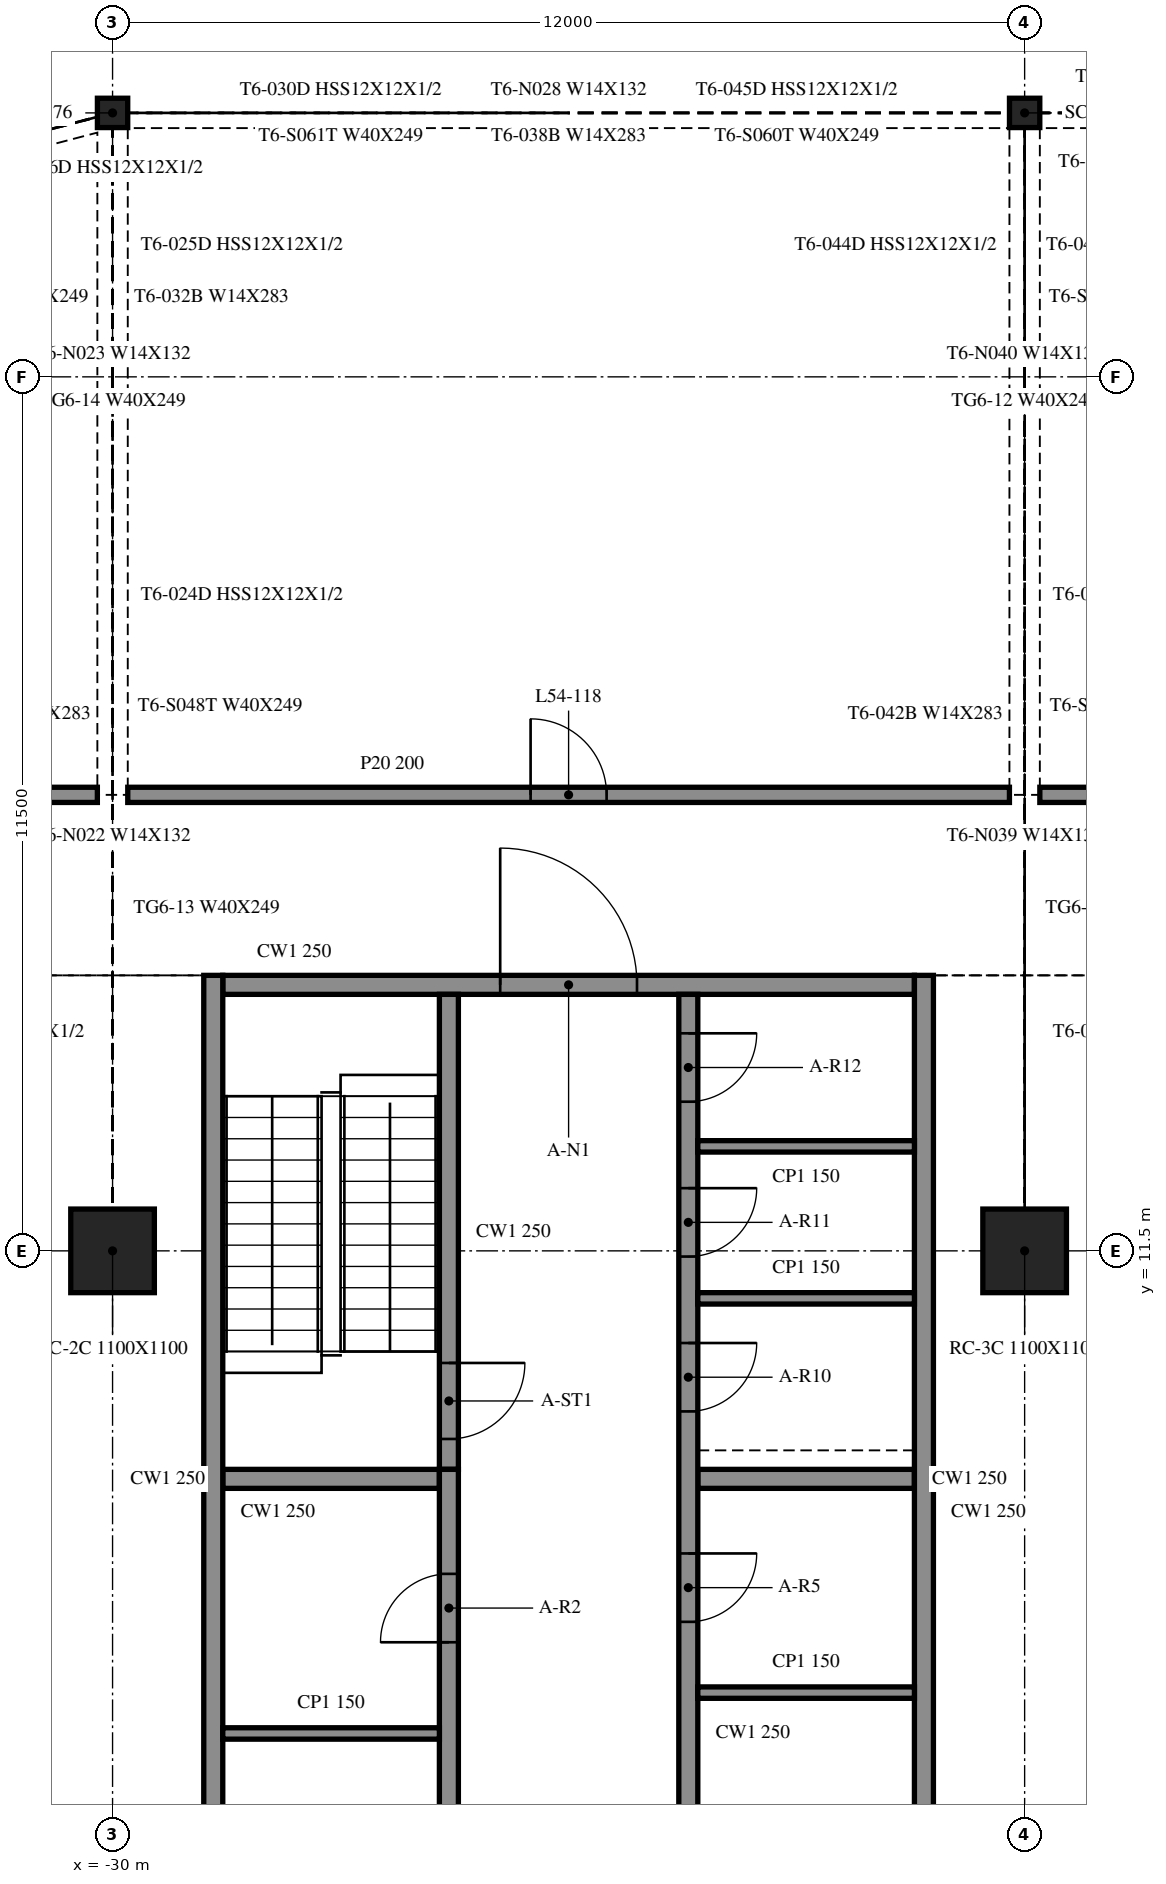
"""IFC4 building model, lengths in metres.
Left out: names, types, materials, properties, quantities, classifications, styles, units other than length and angle.
Written with IfcOpenShell. Run it as: python <this file> out.ifc"""

import sys

from ifc_helpers import new_model, si_unit, direction, frame, frame_2d, origin, origin_2d, place, context, subcontext, project, spatial, rectangle, i_section, extrude, element, fill, save


model = new_model("IFC4")
c1 = context("Model", 3, precision=1e-05, world=origin(), true_north=direction((0.0, 1.0)))
c2 = subcontext(c1, "Body", "Model", "MODEL_VIEW")
j1 = project(units=[si_unit("LENGTHUNIT", "METRE"), si_unit("PLANEANGLEUNIT", "RADIAN")], contexts=[c1])
p1 = place(None, origin())
s1 = spatial("IfcSite", under=j1, at=p1, CompositionType="ELEMENT")
p2 = place(p1, origin())
s2 = spatial("IfcBuilding", under=s1, at=p2, CompositionType="ELEMENT")
p3 = place(p2, frame((0.0, 0.0, 224.3)))
s3 = spatial("IfcBuildingStorey", under=s2, at=p3, CompositionType="ELEMENT", Elevation=224.3)
for number, where, z_axis, x_axis in (
    (1, (-30.0, 11.5, -0.4), (0.0, 0.0, 1.0), (1.0, 0.0, 0.0)),
    (2, (-18.0, 11.5, -0.4), (0.0, 0.0, 1.0), (1.0, 0.0, 0.0)),
):
    element("IfcColumn", number, at=place(p3, frame(where, z_axis=z_axis, x_axis=x_axis)), inside=s3, PredefinedType="COLUMN", context=c2, shape_type="SweptSolid", body=[
        extrude(rectangle(XDim=1.1, YDim=1.1, at=origin_2d()), origin(), (0.0, 0.0, 1.0), 4.36),
    ])
for number, where, z_axis, x_axis in (
    (3, (-18.0, 26.473, -0.4), (0.0, 0.0, 1.0), (1.0, 0.0, 0.0)),
    (4, (-30.0, 26.473, -0.4), (0.0, 0.0, 1.0), (1.0, 0.0, 0.0)),
):
    element("IfcColumn", number, at=place(p3, frame(where, z_axis=z_axis, x_axis=x_axis)), inside=s3, PredefinedType="COLUMN", context=c2, shape_type="SweptSolid", body=[
        extrude(i_section(OverallWidth=0.399, OverallDepth=0.386, WebThickness=0.021, FlangeThickness=0.033, at=origin_2d()), origin(), (0.0, 0.0, 1.0), 4.36),
    ])
for number, where, z_axis, x_axis in (
    (5, (-28.675, 15.125, 0.0), (0.0, 0.0, 1.0), (0.0, -1.0, 0.0)),
    (6, (-19.325, -9.125, 0.0), (0.0, 0.0, 1.0), (0.0, 1.0, 0.0)),
):
    element("IfcWall", number, at=place(p3, frame(where, z_axis=z_axis, x_axis=x_axis)), inside=s3, PredefinedType="SOLIDWALL", context=c2, shape_type="SweptSolid", body=[
        extrude(rectangle(XDim=24.25, YDim=0.25, at=frame_2d((12.125, 0.0))), origin(), (0.0, 0.0, 1.0), 3.96),
    ])
p4 = place(p3, frame((-28.55, 15.0, 0.0), z_axis=(0.0, 0.0, 1.0), x_axis=(1.0, 0.0, 0.0)))
e7 = element("IfcWall", 7, at=p4, inside=s3, PredefinedType="SOLIDWALL", context=c2, shape_type="SweptSolid", body=[
    extrude(rectangle(XDim=9.1, YDim=0.25, at=frame_2d((4.55, 0.0))), origin(), (0.0, 0.0, 1.0), 3.96),
])
p5 = place(p4, frame((3.65, 0.0, 0.0)))
e8 = element("IfcOpeningElement", 8, at=p5, cuts=e7, PredefinedType="OPENING", context=c2, shape_type="SweptSolid", body=[
    extrude(rectangle(XDim=1.8, YDim=2.1, at=frame_2d((0.9, 1.05))), frame((0.0, 0.135, 0.0), z_axis=(0.0, -1.0, 0.0), x_axis=(1.0, 0.0, 0.0)), (0.0, 0.0, 1.0), 0.27),
])
p6 = place(p3, frame((-25.575, -8.875, 0.0), z_axis=(0.0, 0.0, 1.0), x_axis=(0.0, 1.0, 0.0)))
e9 = element("IfcWall", 9, at=p6, inside=s3, PredefinedType="SOLIDWALL", context=c2, shape_type="SweptSolid", body=[
    extrude(rectangle(XDim=17.5, YDim=0.25, at=frame_2d((8.75, 0.0))), origin(), (0.0, 0.0, 1.0), 3.96),
])
p7 = place(p6, frame((9.775, 0.0, 0.0)))
e10 = element("IfcOpeningElement", 10, at=p7, cuts=e9, PredefinedType="OPENING", context=c2, shape_type="SweptSolid", body=[
    extrude(rectangle(XDim=0.9, YDim=2.1, at=frame_2d((0.45, 1.05))), frame((0.0, 0.135, 0.0), z_axis=(0.0, -1.0, 0.0), x_axis=(1.0, 0.0, 0.0)), (0.0, 0.0, 1.0), 0.27),
])
p8 = place(p6, frame((15.225, 0.0, 0.0)))
e11 = element("IfcOpeningElement", 11, at=p8, cuts=e9, PredefinedType="OPENING", context=c2, shape_type="SweptSolid", body=[
    extrude(rectangle(XDim=0.9, YDim=2.1, at=frame_2d((0.45, 1.05))), frame((0.0, 0.135, 0.0), z_axis=(0.0, -1.0, 0.0), x_axis=(1.0, 0.0, 0.0)), (0.0, 0.0, 1.0), 0.27),
])
p9 = place(p6, frame((1.012, 0.0, 0.0)))
e12 = element("IfcOpeningElement", 12, at=p9, cuts=e9, PredefinedType="OPENING", context=c2, shape_type="SweptSolid", body=[
    extrude(rectangle(XDim=0.9, YDim=2.1, at=frame_2d((0.45, 1.05))), frame((0.0, 0.135, 0.0), z_axis=(0.0, -1.0, 0.0), x_axis=(1.0, 0.0, 0.0)), (0.0, 0.0, 1.0), 0.27),
])
p10 = place(p6, frame((4.087, 0.0, 0.0)))
e13 = element("IfcOpeningElement", 13, at=p10, cuts=e9, PredefinedType="OPENING", context=c2, shape_type="SweptSolid", body=[
    extrude(rectangle(XDim=0.9, YDim=2.1, at=frame_2d((0.45, 1.05))), frame((0.0, 0.135, 0.0), z_axis=(0.0, -1.0, 0.0), x_axis=(1.0, 0.0, 0.0)), (0.0, 0.0, 1.0), 0.27),
])
p11 = place(p3, frame((-25.575, 14.875, 0.0), z_axis=(0.0, 0.0, 1.0), x_axis=(0.0, -1.0, 0.0)))
e14 = element("IfcWall", 14, at=p11, inside=s3, PredefinedType="SOLIDWALL", context=c2, shape_type="SweptSolid", body=[
    extrude(rectangle(XDim=6.25, YDim=0.25, at=frame_2d((3.125, 0.0))), origin(), (0.0, 0.0, 1.0), 3.96),
])
p12 = place(p11, frame((4.85, 0.0, 0.0)))
e15 = element("IfcOpeningElement", 15, at=p12, cuts=e14, PredefinedType="OPENING", context=c2, shape_type="SweptSolid", body=[
    extrude(rectangle(XDim=1.0, YDim=2.1, at=frame_2d((0.5, 1.05))), frame((0.0, 0.135, 0.0), z_axis=(0.0, -1.0, 0.0), x_axis=(1.0, 0.0, 0.0)), (0.0, 0.0, 1.0), 0.27),
])
p13 = place(p3, frame((-22.425, 14.875, 0.0), z_axis=(0.0, 0.0, 1.0), x_axis=(0.0, -1.0, 0.0)))
e16 = element("IfcWall", 16, at=p13, inside=s3, PredefinedType="SOLIDWALL", context=c2, shape_type="SweptSolid", body=[
    extrude(rectangle(XDim=23.75, YDim=0.25, at=frame_2d((11.875, 0.0))), origin(), (0.0, 0.0, 1.0), 3.96),
])
p14 = place(p13, frame((15.494, 0.0, 0.0)))
e17 = element("IfcOpeningElement", 17, at=p14, cuts=e16, PredefinedType="OPENING", context=c2, shape_type="SweptSolid", body=[
    extrude(rectangle(XDim=0.9, YDim=2.1, at=frame_2d((0.45, 1.05))), frame((0.0, 0.135, 0.0), z_axis=(0.0, -1.0, 0.0), x_axis=(1.0, 0.0, 0.0)), (0.0, 0.0, 1.0), 0.27),
])
p15 = place(p13, frame((11.425, 0.0, 0.0)))
e18 = element("IfcOpeningElement", 18, at=p15, cuts=e16, PredefinedType="OPENING", context=c2, shape_type="SweptSolid", body=[
    extrude(rectangle(XDim=0.9, YDim=2.1, at=frame_2d((0.45, 1.05))), frame((0.0, 0.135, 0.0), z_axis=(0.0, -1.0, 0.0), x_axis=(1.0, 0.0, 0.0)), (0.0, 0.0, 1.0), 0.27),
])
p16 = place(p13, frame((7.356, 0.0, 0.0)))
e19 = element("IfcOpeningElement", 19, at=p16, cuts=e16, PredefinedType="OPENING", context=c2, shape_type="SweptSolid", body=[
    extrude(rectangle(XDim=0.9, YDim=2.1, at=frame_2d((0.45, 1.05))), frame((0.0, 0.135, 0.0), z_axis=(0.0, -1.0, 0.0), x_axis=(1.0, 0.0, 0.0)), (0.0, 0.0, 1.0), 0.27),
])
p17 = place(p13, frame((21.837, 0.0, 0.0)))
e20 = element("IfcOpeningElement", 20, at=p17, cuts=e16, PredefinedType="OPENING", context=c2, shape_type="SweptSolid", body=[
    extrude(rectangle(XDim=0.9, YDim=2.1, at=frame_2d((0.45, 1.05))), frame((0.0, 0.135, 0.0), z_axis=(0.0, -1.0, 0.0), x_axis=(1.0, 0.0, 0.0)), (0.0, 0.0, 1.0), 0.27),
])
p18 = place(p13, frame((18.762, 0.0, 0.0)))
e21 = element("IfcOpeningElement", 21, at=p18, cuts=e16, PredefinedType="OPENING", context=c2, shape_type="SweptSolid", body=[
    extrude(rectangle(XDim=0.9, YDim=2.1, at=frame_2d((0.45, 1.05))), frame((0.0, 0.135, 0.0), z_axis=(0.0, -1.0, 0.0), x_axis=(1.0, 0.0, 0.0)), (0.0, 0.0, 1.0), 0.27),
])
p19 = place(p13, frame((4.587, 0.0, 0.0)))
e22 = element("IfcOpeningElement", 22, at=p19, cuts=e16, PredefinedType="OPENING", context=c2, shape_type="SweptSolid", body=[
    extrude(rectangle(XDim=0.9, YDim=2.1, at=frame_2d((0.45, 1.05))), frame((0.0, 0.135, 0.0), z_axis=(0.0, -1.0, 0.0), x_axis=(1.0, 0.0, 0.0)), (0.0, 0.0, 1.0), 0.27),
])
p20 = place(p13, frame((2.55, 0.0, 0.0)))
e23 = element("IfcOpeningElement", 23, at=p20, cuts=e16, PredefinedType="OPENING", context=c2, shape_type="SweptSolid", body=[
    extrude(rectangle(XDim=0.9, YDim=2.1, at=frame_2d((0.45, 1.05))), frame((0.0, 0.135, 0.0), z_axis=(0.0, -1.0, 0.0), x_axis=(1.0, 0.0, 0.0)), (0.0, 0.0, 1.0), 0.27),
])
p21 = place(p13, frame((0.512, 0.0, 0.0)))
e24 = element("IfcOpeningElement", 24, at=p21, cuts=e16, PredefinedType="OPENING", context=c2, shape_type="SweptSolid", body=[
    extrude(rectangle(XDim=0.9, YDim=2.1, at=frame_2d((0.45, 1.05))), frame((0.0, 0.135, 0.0), z_axis=(0.0, -1.0, 0.0), x_axis=(1.0, 0.0, 0.0)), (0.0, 0.0, 1.0), 0.27),
])
for number, where, z_axis, x_axis in (
    (25, (-28.55, 8.5, 0.0), (0.0, 0.0, 1.0), (1.0, 0.0, 0.0)),
    (26, (-22.3, 8.5, 0.0), (0.0, 0.0, 1.0), (1.0, 0.0, 0.0)),
):
    element("IfcWall", number, at=place(p3, frame(where, z_axis=z_axis, x_axis=x_axis)), inside=s3, PredefinedType="SOLIDWALL", context=c2, shape_type="SweptSolid", body=[
        extrude(rectangle(XDim=2.85, YDim=0.25, at=frame_2d((1.425, 0.0))), origin(), (0.0, 0.0, 1.0), 3.96),
    ])
for number, where, z_axis, x_axis in (
    (27, (-28.55, 5.15, 0.0), (0.0, 0.0, 1.0), (1.0, 0.0, 0.0)),
    (28, (-22.3, 5.688, 0.0), (0.0, 0.0, 1.0), (1.0, 0.0, 0.0)),
    (29, (-22.3, 10.875, 0.0), (0.0, 0.0, 1.0), (1.0, 0.0, 0.0)),
    (30, (-22.3, 12.875, 0.0), (0.0, 0.0, 1.0), (1.0, 0.0, 0.0)),
):
    element("IfcWall", number, at=place(p3, frame(where, z_axis=z_axis, x_axis=x_axis)), inside=s3, PredefinedType="PARTITIONING", context=c2, shape_type="SweptSolid", body=[
        extrude(rectangle(XDim=2.85, YDim=0.15, at=frame_2d((1.425, 0.0))), origin(), (0.0, 0.0, 1.0), 3.96),
    ])
p22 = place(p3, frame((-42.0, 17.5, 0.0), z_axis=(0.0, 0.0, 1.0), x_axis=(1.0, 0.0, 0.0)))
e31 = element("IfcWall", 31, at=p22, inside=s3, PredefinedType="PARTITIONING", context=c2, shape_type="SweptSolid", body=[
    extrude(rectangle(XDim=11.8, YDim=0.2, at=frame_2d((5.9, 0.0))), origin(), (0.0, 0.0, 1.0), 3.96),
])
p23 = place(p22, frame((4.9, 0.0, 0.0)))
e32 = element("IfcOpeningElement", 32, at=p23, cuts=e31, PredefinedType="OPENING", context=c2, shape_type="SweptSolid", body=[
    extrude(rectangle(XDim=1.2, YDim=2.1, at=frame_2d((0.6, 1.05))), frame((0.0, 0.11, 0.0), z_axis=(0.0, -1.0, 0.0), x_axis=(1.0, 0.0, 0.0)), (0.0, 0.0, 1.0), 0.22),
])
p24 = place(p3, frame((-29.8, 17.5, 0.0), z_axis=(0.0, 0.0, 1.0), x_axis=(1.0, 0.0, 0.0)))
e33 = element("IfcWall", 33, at=p24, inside=s3, PredefinedType="PARTITIONING", context=c2, shape_type="SweptSolid", body=[
    extrude(rectangle(XDim=11.6, YDim=0.2, at=frame_2d((5.8, 0.0))), origin(), (0.0, 0.0, 1.0), 3.96),
])
p25 = place(p24, frame((5.3, 0.0, 0.0)))
e34 = element("IfcOpeningElement", 34, at=p25, cuts=e33, PredefinedType="OPENING", context=c2, shape_type="SweptSolid", body=[
    extrude(rectangle(XDim=1.0, YDim=2.1, at=frame_2d((0.5, 1.05))), frame((0.0, 0.11, 0.0), z_axis=(0.0, -1.0, 0.0), x_axis=(1.0, 0.0, 0.0)), (0.0, 0.0, 1.0), 0.22),
])
p26 = place(p3, frame((-17.8, 17.5, 0.0), z_axis=(0.0, 0.0, 1.0), x_axis=(1.0, 0.0, 0.0)))
e35 = element("IfcWall", 35, at=p26, inside=s3, PredefinedType="PARTITIONING", context=c2, shape_type="SweptSolid", body=[
    extrude(rectangle(XDim=11.6, YDim=0.2, at=frame_2d((5.8, 0.0))), origin(), (0.0, 0.0, 1.0), 3.96),
])
p27 = place(p26, frame((5.3, 0.0, 0.0)))
e36 = element("IfcOpeningElement", 36, at=p27, cuts=e35, PredefinedType="OPENING", context=c2, shape_type="SweptSolid", body=[
    extrude(rectangle(XDim=1.0, YDim=2.1, at=frame_2d((0.5, 1.05))), frame((0.0, 0.11, 0.0), z_axis=(0.0, -1.0, 0.0), x_axis=(1.0, 0.0, 0.0)), (0.0, 0.0, 1.0), 0.22),
])
p28 = place(p5, origin())
e37 = element("IfcDoor", 37, at=p28, inside=s3, OperationType="DOUBLE_DOOR_SINGLE_SWING", PredefinedType="DOOR", context=c2, shape_type="SweptSolid", body=[
    extrude(rectangle(XDim=1.8, YDim=2.1, at=frame_2d((0.9, 1.05))), frame((0.0, 0.025, 0.0), z_axis=(0.0, -1.0, 0.0), x_axis=(1.0, 0.0, 0.0)), (0.0, 0.0, 1.0), 0.05),
])
fill(e8, e37)
p29 = place(p8, origin())
e38 = element("IfcDoor", 38, at=p29, inside=s3, OperationType="SINGLE_SWING_RIGHT", PredefinedType="DOOR", context=c2, shape_type="SweptSolid", body=[
    extrude(rectangle(XDim=0.9, YDim=2.1, at=frame_2d((0.45, 1.05))), frame((0.0, 0.025, 0.0), z_axis=(0.0, -1.0, 0.0), x_axis=(1.0, 0.0, 0.0)), (0.0, 0.0, 1.0), 0.05),
])
fill(e11, e38)
p30 = place(p16, origin())
e39 = element("IfcDoor", 39, at=p30, inside=s3, OperationType="SINGLE_SWING_LEFT", PredefinedType="DOOR", context=c2, shape_type="SweptSolid", body=[
    extrude(rectangle(XDim=0.9, YDim=2.1, at=frame_2d((0.45, 1.05))), frame((0.0, 0.025, 0.0), z_axis=(0.0, -1.0, 0.0), x_axis=(1.0, 0.0, 0.0)), (0.0, 0.0, 1.0), 0.05),
])
fill(e19, e39)
p31 = place(p19, origin())
e40 = element("IfcDoor", 40, at=p31, inside=s3, OperationType="SINGLE_SWING_RIGHT", PredefinedType="DOOR", context=c2, shape_type="SweptSolid", body=[
    extrude(rectangle(XDim=0.9, YDim=2.1, at=frame_2d((0.45, 1.05))), frame((0.0, 0.025, 0.0), z_axis=(0.0, -1.0, 0.0), x_axis=(1.0, 0.0, 0.0)), (0.0, 0.0, 1.0), 0.05),
])
fill(e22, e40)
p32 = place(p20, origin())
e41 = element("IfcDoor", 41, at=p32, inside=s3, OperationType="SINGLE_SWING_LEFT", PredefinedType="DOOR", context=c2, shape_type="SweptSolid", body=[
    extrude(rectangle(XDim=0.9, YDim=2.1, at=frame_2d((0.45, 1.05))), frame((0.0, 0.025, 0.0), z_axis=(0.0, -1.0, 0.0), x_axis=(1.0, 0.0, 0.0)), (0.0, 0.0, 1.0), 0.05),
])
fill(e23, e41)
p33 = place(p21, origin())
e42 = element("IfcDoor", 42, at=p33, inside=s3, OperationType="SINGLE_SWING_RIGHT", PredefinedType="DOOR", context=c2, shape_type="SweptSolid", body=[
    extrude(rectangle(XDim=0.9, YDim=2.1, at=frame_2d((0.45, 1.05))), frame((0.0, 0.025, 0.0), z_axis=(0.0, -1.0, 0.0), x_axis=(1.0, 0.0, 0.0)), (0.0, 0.0, 1.0), 0.05),
])
fill(e24, e42)
p34 = place(p12, origin())
e43 = element("IfcDoor", 43, at=p34, inside=s3, OperationType="SINGLE_SWING_LEFT", PredefinedType="DOOR", context=c2, shape_type="SweptSolid", body=[
    extrude(rectangle(XDim=1.0, YDim=2.1, at=frame_2d((0.5, 1.05))), frame((0.0, 0.025, 0.0), z_axis=(0.0, -1.0, 0.0), x_axis=(1.0, 0.0, 0.0)), (0.0, 0.0, 1.0), 0.05),
])
fill(e15, e43)
p35 = place(p25, origin())
e44 = element("IfcDoor", 44, at=p35, inside=s3, OperationType="SINGLE_SWING_LEFT", PredefinedType="DOOR", context=c2, shape_type="SweptSolid", body=[
    extrude(rectangle(XDim=1.0, YDim=2.1, at=frame_2d((0.5, 1.05))), frame((0.0, 0.025, 0.0), z_axis=(0.0, -1.0, 0.0), x_axis=(1.0, 0.0, 0.0)), (0.0, 0.0, 1.0), 0.05),
])
fill(e34, e44)
save(model, sys.argv[1])
